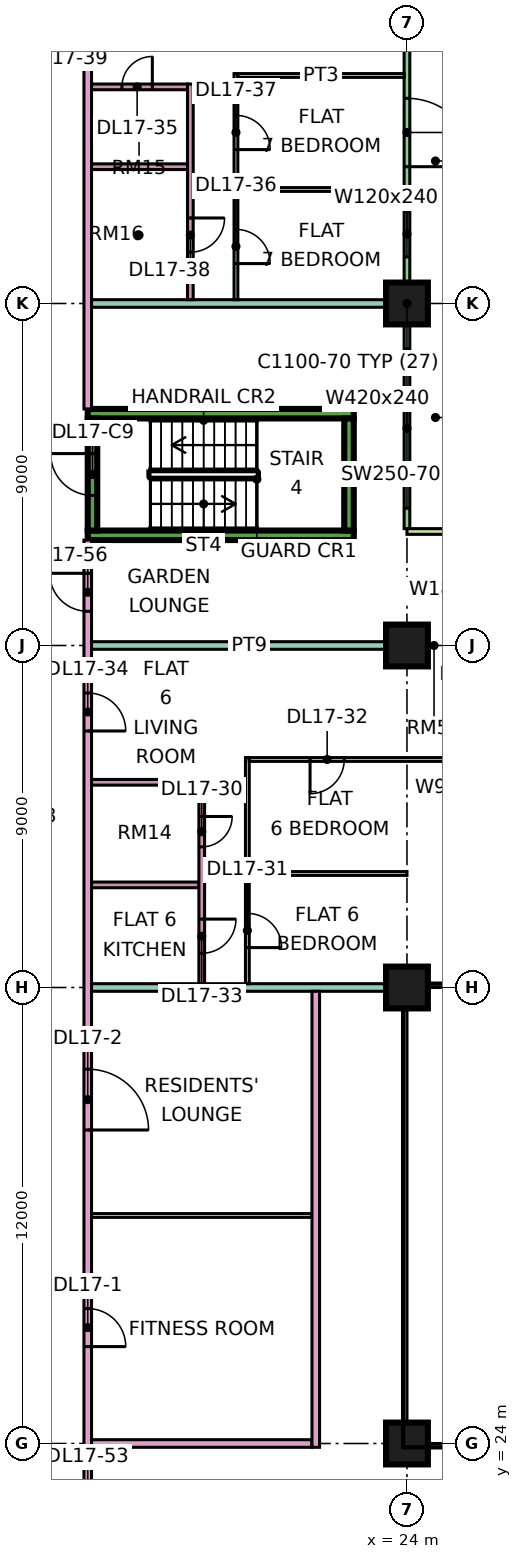
"""IFC4 building model, lengths in metres.
Left out: names, types, materials, properties, quantities, classifications, styles, units other than length and angle.
Written with IfcOpenShell. Run it as: python <this file> out.ifc"""

import sys

from ifc_helpers import new_model, si_unit, direction, frame, frame_2d, origin, origin_2d, place, context, subcontext, project, spatial, rectangle, extrude, element, fill, save


model = new_model("IFC4")
c1 = context("Model", 3, precision=1e-05, world=origin(), true_north=direction((0.0, 1.0)))
c2 = subcontext(c1, "Body", "Model", "MODEL_VIEW")
j1 = project(units=[si_unit("LENGTHUNIT", "METRE"), si_unit("PLANEANGLEUNIT", "RADIAN")], contexts=[c1])
p1 = place(None, origin())
s1 = spatial("IfcSite", under=j1, at=p1, CompositionType="ELEMENT")
p2 = place(p1, origin())
s2 = spatial("IfcBuilding", under=s1, at=p2, CompositionType="ELEMENT")
p3 = place(p2, frame((0.0, 0.0, 78.9)))
s3 = spatial("IfcBuildingStorey", under=s2, at=p3, CompositionType="ELEMENT", Elevation=78.9)
for number, where, z_axis, x_axis in (
    (1, (24.0, 24.0, 0.0), (0.0, 0.0, 1.0), (1.0, 0.0, 0.0)),
    (2, (24.0, 36.0, 0.0), (0.0, 0.0, 1.0), (1.0, 0.0, 0.0)),
    (3, (24.0, 45.0, 0.0), (0.0, 0.0, 1.0), (1.0, 0.0, 0.0)),
    (4, (24.0, 54.0, 0.0), (0.0, 0.0, 1.0), (1.0, 0.0, 0.0)),
):
    element("IfcColumn", number, at=place(p3, frame(where, z_axis=z_axis, x_axis=x_axis)), inside=s3, PredefinedType="COLUMN", context=c2, shape_type="SweptSolid", body=[
        extrude(rectangle(XDim=1.1, YDim=1.1, at=origin_2d()), origin(), (0.0, 0.0, 1.0), 3.75),
    ])
for number, where, z_axis, x_axis in (
    (5, (15.6, 47.9, 0.0), (0.0, 0.0, 1.0), (1.0, 0.0, 0.0)),
    (6, (15.6, 51.1, 0.0), (0.0, 0.0, 1.0), (1.0, 0.0, 0.0)),
):
    element("IfcWall", number, at=place(p3, frame(where, z_axis=z_axis, x_axis=x_axis)), inside=s3, PredefinedType="SHEAR", context=c2, shape_type="SweptSolid", body=[
        extrude(rectangle(XDim=7.0, YDim=0.25, at=frame_2d((3.5, 0.0))), origin(), (0.0, 0.0, 1.0), 3.75),
    ])
p4 = place(p3, frame((15.725, 48.025, 0.0), z_axis=(0.0, 0.0, 1.0), x_axis=(0.0, 1.0, 0.0)))
e7 = element("IfcWall", 7, at=p4, inside=s3, PredefinedType="SHEAR", context=c2, shape_type="SweptSolid", body=[
    extrude(rectangle(XDim=2.95, YDim=0.25, at=frame_2d((1.475, 0.0))), origin(), (0.0, 0.0, 1.0), 3.75),
])
p5 = place(p4, frame((0.925, 0.0, 0.0)))
e8 = element("IfcOpeningElement", 8, at=p5, cuts=e7, PredefinedType="OPENING", context=c2, shape_type="SweptSolid", body=[
    extrude(rectangle(XDim=1.1, YDim=2.2, at=frame_2d((0.55, 1.1))), frame((0.0, 0.135, 0.0), z_axis=(0.0, -1.0, 0.0), x_axis=(1.0, 0.0, 0.0)), (0.0, 0.0, 1.0), 0.27),
])
p6 = place(p3, frame((22.475, 48.025, 0.0), z_axis=(0.0, 0.0, 1.0), x_axis=(0.0, 1.0, 0.0)))
e9 = element("IfcWall", 9, at=p6, inside=s3, PredefinedType="SHEAR", context=c2, shape_type="SweptSolid", body=[
    extrude(rectangle(XDim=2.95, YDim=0.25, at=frame_2d((1.475, 0.0))), origin(), (0.0, 0.0, 1.0), 3.75),
])
p7 = place(p3, frame((24.0, 48.075, 0.0), z_axis=(0.0, 0.0, 1.0), x_axis=(0.0, 1.0, 0.0)))
e10 = element("IfcWall", 10, at=p7, inside=s3, PredefinedType="SOLIDWALL", context=c2, shape_type="SweptSolid", body=[
    extrude(rectangle(XDim=13.35, YDim=0.15, at=frame_2d((6.675, 0.0))), origin(), (0.0, 0.0, 1.0), 3.35),
])
p8 = place(p7, frame((0.538, 0.0, 0.45)))
e11 = element("IfcOpeningElement", 11, at=p8, cuts=e10, PredefinedType="OPENING", context=c2, shape_type="SweptSolid", body=[
    extrude(rectangle(XDim=4.2, YDim=2.4, at=frame_2d((2.1, 1.2))), frame((0.0, 0.085, 0.0), z_axis=(0.0, -1.0, 0.0), x_axis=(1.0, 0.0, 0.0)), (0.0, 0.0, 1.0), 0.17),
])
p9 = place(p7, frame((7.15, 0.0, 0.45)))
e12 = element("IfcOpeningElement", 12, at=p9, cuts=e10, PredefinedType="OPENING", context=c2, shape_type="SweptSolid", body=[
    extrude(rectangle(XDim=1.2, YDim=2.4, at=frame_2d((0.6, 1.2))), frame((0.0, 0.085, 0.0), z_axis=(0.0, -1.0, 0.0), x_axis=(1.0, 0.0, 0.0)), (0.0, 0.0, 1.0), 0.17),
])
p10 = place(p7, frame((9.525, 0.0, 0.0)))
e13 = element("IfcOpeningElement", 13, at=p10, cuts=e10, PredefinedType="OPENING", context=c2, shape_type="SweptSolid", body=[
    extrude(rectangle(XDim=1.8, YDim=2.4, at=frame_2d((0.9, 1.2))), frame((0.0, 0.085, 0.0), z_axis=(0.0, -1.0, 0.0), x_axis=(1.0, 0.0, 0.0)), (0.0, 0.0, 1.0), 0.17),
])
p11 = place(p3, frame((25.5, 48.0, 0.0), z_axis=(0.0, 0.0, 1.0), x_axis=(-1.0, 0.0, 0.0)))
e14 = element("IfcWall", 14, at=p11, inside=s3, PredefinedType="SOLIDWALL", context=c2, shape_type="SweptSolid", body=[
    extrude(rectangle(XDim=1.5, YDim=0.15, at=frame_2d((0.75, 0.0))), origin(), (0.0, 0.0, 1.0), 3.35),
])
p12 = place(p3, frame((15.6, 20.0, 0.0), z_axis=(0.0, 0.0, 1.0), x_axis=(0.0, 1.0, 0.0)))
e15 = element("IfcWall", 15, at=p12, inside=s3, PredefinedType="PARTITIONING", context=c2, shape_type="SweptSolid", body=[
    extrude(rectangle(XDim=27.775, YDim=0.2, at=frame_2d((13.887, 0.0))), origin(), (0.0, 0.0, 1.0), 3.35),
])
p13 = place(p12, frame((6.55, 0.0, 0.0)))
e16 = element("IfcOpeningElement", 16, at=p13, cuts=e15, PredefinedType="OPENING", context=c2, shape_type="SweptSolid", body=[
    extrude(rectangle(XDim=1.0, YDim=2.1, at=frame_2d((0.5, 1.05))), frame((0.0, 0.11, 0.0), z_axis=(0.0, -1.0, 0.0), x_axis=(1.0, 0.0, 0.0)), (0.0, 0.0, 1.0), 0.22),
])
p14 = place(p12, frame((12.25, 0.0, 0.0)))
e17 = element("IfcOpeningElement", 17, at=p14, cuts=e15, PredefinedType="OPENING", context=c2, shape_type="SweptSolid", body=[
    extrude(rectangle(XDim=1.6, YDim=2.1, at=frame_2d((0.8, 1.05))), frame((0.0, 0.11, 0.0), z_axis=(0.0, -1.0, 0.0), x_axis=(1.0, 0.0, 0.0)), (0.0, 0.0, 1.0), 0.22),
])
p15 = place(p12, frame((22.75, 0.0, 0.0)))
e18 = element("IfcOpeningElement", 18, at=p15, cuts=e15, PredefinedType="OPENING", context=c2, shape_type="SweptSolid", body=[
    extrude(rectangle(XDim=1.0, YDim=2.1, at=frame_2d((0.5, 1.05))), frame((0.0, 0.11, 0.0), z_axis=(0.0, -1.0, 0.0), x_axis=(1.0, 0.0, 0.0)), (0.0, 0.0, 1.0), 0.22),
])
p16 = place(p12, frame((1.15, 0.0, 0.0)))
e19 = element("IfcOpeningElement", 19, at=p16, cuts=e15, PredefinedType="OPENING", context=c2, shape_type="SweptSolid", body=[
    extrude(rectangle(XDim=1.8, YDim=2.1, at=frame_2d((0.9, 1.05))), frame((0.0, 0.11, 0.0), z_axis=(0.0, -1.0, 0.0), x_axis=(1.0, 0.0, 0.0)), (0.0, 0.0, 1.0), 0.22),
])
p17 = place(p12, frame((25.9, 0.0, 0.0)))
e20 = element("IfcOpeningElement", 20, at=p17, cuts=e15, PredefinedType="OPENING", context=c2, shape_type="SweptSolid", body=[
    extrude(rectangle(XDim=1.0, YDim=2.1, at=frame_2d((0.5, 1.05))), frame((0.0, 0.11, 0.0), z_axis=(0.0, -1.0, 0.0), x_axis=(1.0, 0.0, 0.0)), (0.0, 0.0, 1.0), 0.22),
])
p18 = place(p3, frame((15.6, 51.225, 0.0), z_axis=(0.0, 0.0, 1.0), x_axis=(0.0, 1.0, 0.0)))
e21 = element("IfcWall", 21, at=p18, inside=s3, PredefinedType="PARTITIONING", context=c2, shape_type="SweptSolid", body=[
    extrude(rectangle(XDim=13.125, YDim=0.2, at=frame_2d((6.562, 0.0))), origin(), (0.0, 0.0, 1.0), 3.35),
])
p19 = place(p18, frame((9.675, 0.0, 0.0)))
e22 = element("IfcOpeningElement", 22, at=p19, cuts=e21, PredefinedType="OPENING", context=c2, shape_type="SweptSolid", body=[
    extrude(rectangle(XDim=1.0, YDim=2.1, at=frame_2d((0.5, 1.05))), frame((0.0, 0.11, 0.0), z_axis=(0.0, -1.0, 0.0), x_axis=(1.0, 0.0, 0.0)), (0.0, 0.0, 1.0), 0.22),
])
p20 = place(p3, frame((15.7, 24.0, 0.0), z_axis=(0.0, 0.0, 1.0), x_axis=(1.0, 0.0, 0.0)))
e23 = element("IfcWall", 23, at=p20, inside=s3, PredefinedType="PARTITIONING", context=c2, shape_type="SweptSolid", body=[
    extrude(rectangle(XDim=5.8, YDim=0.2, at=frame_2d((2.9, 0.0))), origin(), (0.0, 0.0, 1.0), 3.35),
])
p21 = place(p3, frame((15.7, 30.0, 0.0), z_axis=(0.0, 0.0, 1.0), x_axis=(1.0, 0.0, 0.0)))
e24 = element("IfcWall", 24, at=p21, inside=s3, PredefinedType="PARTITIONING", context=c2, shape_type="SweptSolid", body=[
    extrude(rectangle(XDim=5.8, YDim=0.1, at=frame_2d((2.9, 0.0))), origin(), (0.0, 0.0, 1.0), 3.35),
])
p22 = place(p3, frame((15.7, 36.0, 0.0), z_axis=(0.0, 0.0, 1.0), x_axis=(1.0, 0.0, 0.0)))
e25 = element("IfcWall", 25, at=p22, inside=s3, PredefinedType="PARTITIONING", context=c2, shape_type="SweptSolid", body=[
    extrude(rectangle(XDim=8.3, YDim=0.2, at=frame_2d((4.15, 0.0))), origin(), (0.0, 0.0, 1.0), 3.35),
])
for number, where, z_axis, x_axis in (
    (26, (15.7, 38.7, 0.0), (0.0, 0.0, 1.0), (1.0, 0.0, 0.0)),
    (27, (15.7, 41.4, 0.0), (0.0, 0.0, 1.0), (1.0, 0.0, 0.0)),
):
    element("IfcWall", number, at=place(p3, frame(where, z_axis=z_axis, x_axis=x_axis)), inside=s3, PredefinedType="PARTITIONING", context=c2, shape_type="SweptSolid", body=[
        extrude(rectangle(XDim=2.825, YDim=0.15, at=frame_2d((1.413, 0.0))), origin(), (0.0, 0.0, 1.0), 3.35),
    ])
p23 = place(p3, frame((15.7, 45.0, 0.0), z_axis=(0.0, 0.0, 1.0), x_axis=(1.0, 0.0, 0.0)))
e28 = element("IfcWall", 28, at=p23, inside=s3, PredefinedType="PARTITIONING", context=c2, shape_type="SweptSolid", body=[
    extrude(rectangle(XDim=8.3, YDim=0.2, at=frame_2d((4.15, 0.0))), origin(), (0.0, 0.0, 1.0), 3.35),
])
p24 = place(p3, frame((15.7, 54.0, 0.0), z_axis=(0.0, 0.0, 1.0), x_axis=(1.0, 0.0, 0.0)))
e29 = element("IfcWall", 29, at=p24, inside=s3, PredefinedType="PARTITIONING", context=c2, shape_type="SweptSolid", body=[
    extrude(rectangle(XDim=8.226, YDim=0.2, at=frame_2d((4.113, 0.0))), origin(), (0.0, 0.0, 1.0), 3.35),
])
p25 = place(p3, frame((15.7, 57.6, 0.0), z_axis=(0.0, 0.0, 1.0), x_axis=(1.0, 0.0, 0.0)))
e30 = element("IfcWall", 30, at=p25, inside=s3, PredefinedType="PARTITIONING", context=c2, shape_type="SweptSolid", body=[
    extrude(rectangle(XDim=2.525, YDim=0.15, at=frame_2d((1.263, 0.0))), origin(), (0.0, 0.0, 1.0), 3.35),
])
p26 = place(p3, frame((15.7, 59.7, 0.0), z_axis=(0.0, 0.0, 1.0), x_axis=(1.0, 0.0, 0.0)))
e31 = element("IfcWall", 31, at=p26, inside=s3, PredefinedType="PARTITIONING", context=c2, shape_type="SweptSolid", body=[
    extrude(rectangle(XDim=2.525, YDim=0.15, at=frame_2d((1.263, 0.0))), origin(), (0.0, 0.0, 1.0), 3.35),
])
p27 = place(p26, frame((0.8, 0.0, 0.0)))
e32 = element("IfcOpeningElement", 32, at=p27, cuts=e31, PredefinedType="OPENING", context=c2, shape_type="SweptSolid", body=[
    extrude(rectangle(XDim=0.8, YDim=2.1, at=frame_2d((0.4, 1.05))), frame((0.0, 0.085, 0.0), z_axis=(0.0, -1.0, 0.0), x_axis=(1.0, 0.0, 0.0)), (0.0, 0.0, 1.0), 0.17),
])
p28 = place(p3, frame((18.3, 54.1, 0.0), z_axis=(0.0, 0.0, 1.0), x_axis=(0.0, 1.0, 0.0)))
e33 = element("IfcWall", 33, at=p28, inside=s3, PredefinedType="PARTITIONING", context=c2, shape_type="SweptSolid", body=[
    extrude(rectangle(XDim=5.675, YDim=0.15, at=frame_2d((2.837, 0.0))), origin(), (0.0, 0.0, 1.0), 3.35),
])
p29 = place(p28, frame((1.25, 0.0, 0.0)))
e34 = element("IfcOpeningElement", 34, at=p29, cuts=e33, PredefinedType="OPENING", context=c2, shape_type="SweptSolid", body=[
    extrude(rectangle(XDim=0.9, YDim=2.1, at=frame_2d((0.45, 1.05))), frame((0.0, 0.085, 0.0), z_axis=(0.0, -1.0, 0.0), x_axis=(1.0, 0.0, 0.0)), (0.0, 0.0, 1.0), 0.17),
])
p30 = place(p3, frame((18.6, 36.1, 0.0), z_axis=(0.0, 0.0, 1.0), x_axis=(0.0, 1.0, 0.0)))
e35 = element("IfcWall", 35, at=p30, inside=s3, PredefinedType="PARTITIONING", context=c2, shape_type="SweptSolid", body=[
    extrude(rectangle(XDim=5.375, YDim=0.15, at=frame_2d((2.688, 0.0))), origin(), (0.0, 0.0, 1.0), 3.35),
])
p31 = place(p30, frame((3.6, 0.0, 0.0)))
e36 = element("IfcOpeningElement", 36, at=p31, cuts=e35, PredefinedType="OPENING", context=c2, shape_type="SweptSolid", body=[
    extrude(rectangle(XDim=0.8, YDim=2.1, at=frame_2d((0.4, 1.05))), frame((0.0, 0.085, 0.0), z_axis=(0.0, -1.0, 0.0), x_axis=(1.0, 0.0, 0.0)), (0.0, 0.0, 1.0), 0.17),
])
p32 = place(p30, frame((0.8, 0.0, 0.0)))
e37 = element("IfcOpeningElement", 37, at=p32, cuts=e35, PredefinedType="OPENING", context=c2, shape_type="SweptSolid", body=[
    extrude(rectangle(XDim=0.9, YDim=2.1, at=frame_2d((0.45, 1.05))), frame((0.0, 0.085, 0.0), z_axis=(0.0, -1.0, 0.0), x_axis=(1.0, 0.0, 0.0)), (0.0, 0.0, 1.0), 0.17),
])
p33 = place(p3, frame((19.5, 54.1, 0.0), z_axis=(0.0, 0.0, 1.0), x_axis=(0.0, 1.0, 0.0)))
e38 = element("IfcWall", 38, at=p33, inside=s3, PredefinedType="PARTITIONING", context=c2, shape_type="SweptSolid", body=[
    extrude(rectangle(XDim=5.95, YDim=0.1, at=frame_2d((2.975, 0.0))), origin(), (0.0, 0.0, 1.0), 3.35),
])
p34 = place(p33, frame((0.95, 0.0, 0.0)))
e39 = element("IfcOpeningElement", 39, at=p34, cuts=e38, PredefinedType="OPENING", context=c2, shape_type="SweptSolid", body=[
    extrude(rectangle(XDim=0.9, YDim=2.1, at=frame_2d((0.45, 1.05))), frame((0.0, 0.06, 0.0), z_axis=(0.0, -1.0, 0.0), x_axis=(1.0, 0.0, 0.0)), (0.0, 0.0, 1.0), 0.12),
])
p35 = place(p33, frame((3.95, 0.0, 0.0)))
e40 = element("IfcOpeningElement", 40, at=p35, cuts=e38, PredefinedType="OPENING", context=c2, shape_type="SweptSolid", body=[
    extrude(rectangle(XDim=0.9, YDim=2.1, at=frame_2d((0.45, 1.05))), frame((0.0, 0.06, 0.0), z_axis=(0.0, -1.0, 0.0), x_axis=(1.0, 0.0, 0.0)), (0.0, 0.0, 1.0), 0.12),
])
for number, where, z_axis, x_axis in (
    (41, (19.55, 57.0, 0.0), (0.0, 0.0, 1.0), (1.0, 0.0, 0.0)),
    (42, (19.55, 60.0, 0.0), (0.0, 0.0, 1.0), (1.0, 0.0, 0.0)),
):
    element("IfcWall", number, at=place(p3, frame(where, z_axis=z_axis, x_axis=x_axis)), inside=s3, PredefinedType="PARTITIONING", context=c2, shape_type="SweptSolid", body=[
        extrude(rectangle(XDim=4.376, YDim=0.1, at=frame_2d((2.188, 0.0))), origin(), (0.0, 0.0, 1.0), 3.35),
    ])
p36 = place(p3, frame((19.8, 36.1, 0.0), z_axis=(0.0, 0.0, 1.0), x_axis=(0.0, 1.0, 0.0)))
e43 = element("IfcWall", 43, at=p36, inside=s3, PredefinedType="PARTITIONING", context=c2, shape_type="SweptSolid", body=[
    extrude(rectangle(XDim=5.95, YDim=0.1, at=frame_2d((2.975, 0.0))), origin(), (0.0, 0.0, 1.0), 3.35),
])
p37 = place(p36, frame((0.95, 0.0, 0.0)))
e44 = element("IfcOpeningElement", 44, at=p37, cuts=e43, PredefinedType="OPENING", context=c2, shape_type="SweptSolid", body=[
    extrude(rectangle(XDim=0.9, YDim=2.1, at=frame_2d((0.45, 1.05))), frame((0.0, 0.06, 0.0), z_axis=(0.0, -1.0, 0.0), x_axis=(1.0, 0.0, 0.0)), (0.0, 0.0, 1.0), 0.12),
])
p38 = place(p3, frame((19.85, 39.0, 0.0), z_axis=(0.0, 0.0, 1.0), x_axis=(1.0, 0.0, 0.0)))
e45 = element("IfcWall", 45, at=p38, inside=s3, PredefinedType="PARTITIONING", context=c2, shape_type="SweptSolid", body=[
    extrude(rectangle(XDim=4.15, YDim=0.1, at=frame_2d((2.075, 0.0))), origin(), (0.0, 0.0, 1.0), 3.35),
])
p39 = place(p3, frame((19.85, 42.0, 0.0), z_axis=(0.0, 0.0, 1.0), x_axis=(1.0, 0.0, 0.0)))
e46 = element("IfcWall", 46, at=p39, inside=s3, PredefinedType="PARTITIONING", context=c2, shape_type="SweptSolid", body=[
    extrude(rectangle(XDim=5.5, YDim=0.1, at=frame_2d((2.75, 0.0))), origin(), (0.0, 0.0, 1.0), 3.35),
])
p40 = place(p39, frame((1.6, 0.0, 0.0)))
e47 = element("IfcOpeningElement", 47, at=p40, cuts=e46, PredefinedType="OPENING", context=c2, shape_type="SweptSolid", body=[
    extrude(rectangle(XDim=0.9, YDim=2.1, at=frame_2d((0.45, 1.05))), frame((0.0, 0.06, 0.0), z_axis=(0.0, -1.0, 0.0), x_axis=(1.0, 0.0, 0.0)), (0.0, 0.0, 1.0), 0.12),
])
p41 = place(p3, frame((21.6, 23.9, 0.0), z_axis=(0.0, 0.0, 1.0), x_axis=(0.0, 1.0, 0.0)))
e48 = element("IfcWall", 48, at=p41, inside=s3, PredefinedType="PARTITIONING", context=c2, shape_type="SweptSolid", body=[
    extrude(rectangle(XDim=12.0, YDim=0.2, at=frame_2d((6.0, 0.0))), origin(), (0.0, 0.0, 1.0), 3.35),
])
p42 = place(p8, origin())
e49 = element("IfcWindow", 49, at=p42, inside=s3, PartitioningType="SINGLE_PANEL", PredefinedType="WINDOW", context=c2, shape_type="SweptSolid", body=[
    extrude(rectangle(XDim=4.2, YDim=2.4, at=frame_2d((2.1, 1.2))), frame((0.0, 0.03, 0.0), z_axis=(0.0, -1.0, 0.0), x_axis=(1.0, 0.0, 0.0)), (0.0, 0.0, 1.0), 0.06),
])
fill(e11, e49)
p43 = place(p9, origin())
e50 = element("IfcWindow", 50, at=p43, inside=s3, PartitioningType="SINGLE_PANEL", PredefinedType="WINDOW", context=c2, shape_type="SweptSolid", body=[
    extrude(rectangle(XDim=1.2, YDim=2.4, at=frame_2d((0.6, 1.2))), frame((0.0, 0.03, 0.0), z_axis=(0.0, -1.0, 0.0), x_axis=(1.0, 0.0, 0.0)), (0.0, 0.0, 1.0), 0.06),
])
fill(e12, e50)
p44 = place(p10, frame((1.8, 0.0, 0.0), z_axis=(0.0, 0.0, 1.0), x_axis=(-1.0, 0.0, 0.0)))
e51 = element("IfcDoor", 51, at=p44, inside=s3, OperationType="DOUBLE_DOOR_SINGLE_SWING", PredefinedType="DOOR", context=c2, shape_type="SweptSolid", body=[
    extrude(rectangle(XDim=1.8, YDim=2.4, at=frame_2d((0.9, 1.2))), frame((0.0, 0.025, 0.0), z_axis=(0.0, -1.0, 0.0), x_axis=(1.0, 0.0, 0.0)), (0.0, 0.0, 1.0), 0.05),
])
fill(e13, e51)
p45 = place(p5, frame((1.1, 0.0, 0.0), z_axis=(0.0, 0.0, 1.0), x_axis=(-1.0, 0.0, 0.0)))
e52 = element("IfcDoor", 52, at=p45, inside=s3, OperationType="SINGLE_SWING_RIGHT", PredefinedType="DOOR", context=c2, shape_type="SweptSolid", body=[
    extrude(rectangle(XDim=1.1, YDim=2.2, at=frame_2d((0.55, 1.1))), frame((0.0, 0.025, 0.0), z_axis=(0.0, -1.0, 0.0), x_axis=(1.0, 0.0, 0.0)), (0.0, 0.0, 1.0), 0.05),
])
fill(e8, e52)
p46 = place(p13, frame((1.0, 0.0, 0.0), z_axis=(0.0, 0.0, 1.0), x_axis=(-1.0, 0.0, 0.0)))
e53 = element("IfcDoor", 53, at=p46, inside=s3, OperationType="SINGLE_SWING_LEFT", PredefinedType="DOOR", context=c2, shape_type="SweptSolid", body=[
    extrude(rectangle(XDim=1.0, YDim=2.1, at=frame_2d((0.5, 1.05))), frame((0.0, 0.025, 0.0), z_axis=(0.0, -1.0, 0.0), x_axis=(1.0, 0.0, 0.0)), (0.0, 0.0, 1.0), 0.05),
])
fill(e16, e53)
p47 = place(p14, frame((1.6, 0.0, 0.0), z_axis=(0.0, 0.0, 1.0), x_axis=(-1.0, 0.0, 0.0)))
e54 = element("IfcDoor", 54, at=p47, inside=s3, OperationType="DOUBLE_DOOR_SINGLE_SWING", PredefinedType="DOOR", context=c2, shape_type="SweptSolid", body=[
    extrude(rectangle(XDim=1.6, YDim=2.1, at=frame_2d((0.8, 1.05))), frame((0.0, 0.025, 0.0), z_axis=(0.0, -1.0, 0.0), x_axis=(1.0, 0.0, 0.0)), (0.0, 0.0, 1.0), 0.05),
])
fill(e17, e54)
p48 = place(p31, origin())
e55 = element("IfcDoor", 55, at=p48, inside=s3, OperationType="SINGLE_SWING_RIGHT", PredefinedType="DOOR", context=c2, shape_type="SweptSolid", body=[
    extrude(rectangle(XDim=0.8, YDim=2.1, at=frame_2d((0.4, 1.05))), frame((0.0, 0.025, 0.0), z_axis=(0.0, -1.0, 0.0), x_axis=(1.0, 0.0, 0.0)), (0.0, 0.0, 1.0), 0.05),
])
fill(e36, e55)
p49 = place(p37, frame((0.9, 0.0, 0.0), z_axis=(0.0, 0.0, 1.0), x_axis=(-1.0, 0.0, 0.0)))
e56 = element("IfcDoor", 56, at=p49, inside=s3, OperationType="SINGLE_SWING_LEFT", PredefinedType="DOOR", context=c2, shape_type="SweptSolid", body=[
    extrude(rectangle(XDim=0.9, YDim=2.1, at=frame_2d((0.45, 1.05))), frame((0.0, 0.025, 0.0), z_axis=(0.0, -1.0, 0.0), x_axis=(1.0, 0.0, 0.0)), (0.0, 0.0, 1.0), 0.05),
])
fill(e44, e56)
p50 = place(p40, frame((0.9, 0.0, 0.0), z_axis=(0.0, 0.0, 1.0), x_axis=(-1.0, 0.0, 0.0)))
e57 = element("IfcDoor", 57, at=p50, inside=s3, OperationType="SINGLE_SWING_LEFT", PredefinedType="DOOR", context=c2, shape_type="SweptSolid", body=[
    extrude(rectangle(XDim=0.9, YDim=2.1, at=frame_2d((0.45, 1.05))), frame((0.0, 0.025, 0.0), z_axis=(0.0, -1.0, 0.0), x_axis=(1.0, 0.0, 0.0)), (0.0, 0.0, 1.0), 0.05),
])
fill(e47, e57)
p51 = place(p32, origin())
e58 = element("IfcDoor", 58, at=p51, inside=s3, OperationType="SINGLE_SWING_RIGHT", PredefinedType="DOOR", context=c2, shape_type="SweptSolid", body=[
    extrude(rectangle(XDim=0.9, YDim=2.1, at=frame_2d((0.45, 1.05))), frame((0.0, 0.025, 0.0), z_axis=(0.0, -1.0, 0.0), x_axis=(1.0, 0.0, 0.0)), (0.0, 0.0, 1.0), 0.05),
])
fill(e37, e58)
p52 = place(p15, frame((1.0, 0.0, 0.0), z_axis=(0.0, 0.0, 1.0), x_axis=(-1.0, 0.0, 0.0)))
e59 = element("IfcDoor", 59, at=p52, inside=s3, OperationType="SINGLE_SWING_LEFT", PredefinedType="DOOR", context=c2, shape_type="SweptSolid", body=[
    extrude(rectangle(XDim=1.0, YDim=2.1, at=frame_2d((0.5, 1.05))), frame((0.0, 0.025, 0.0), z_axis=(0.0, -1.0, 0.0), x_axis=(1.0, 0.0, 0.0)), (0.0, 0.0, 1.0), 0.05),
])
fill(e18, e59)
p53 = place(p27, frame((0.8, 0.0, 0.0), z_axis=(0.0, 0.0, 1.0), x_axis=(-1.0, 0.0, 0.0)))
e60 = element("IfcDoor", 60, at=p53, inside=s3, OperationType="SINGLE_SWING_RIGHT", PredefinedType="DOOR", context=c2, shape_type="SweptSolid", body=[
    extrude(rectangle(XDim=0.8, YDim=2.1, at=frame_2d((0.4, 1.05))), frame((0.0, 0.025, 0.0), z_axis=(0.0, -1.0, 0.0), x_axis=(1.0, 0.0, 0.0)), (0.0, 0.0, 1.0), 0.05),
])
fill(e32, e60)
p54 = place(p34, frame((0.9, 0.0, 0.0), z_axis=(0.0, 0.0, 1.0), x_axis=(-1.0, 0.0, 0.0)))
e61 = element("IfcDoor", 61, at=p54, inside=s3, OperationType="SINGLE_SWING_LEFT", PredefinedType="DOOR", context=c2, shape_type="SweptSolid", body=[
    extrude(rectangle(XDim=0.9, YDim=2.1, at=frame_2d((0.45, 1.05))), frame((0.0, 0.025, 0.0), z_axis=(0.0, -1.0, 0.0), x_axis=(1.0, 0.0, 0.0)), (0.0, 0.0, 1.0), 0.05),
])
fill(e39, e61)
p55 = place(p35, frame((0.9, 0.0, 0.0), z_axis=(0.0, 0.0, 1.0), x_axis=(-1.0, 0.0, 0.0)))
e62 = element("IfcDoor", 62, at=p55, inside=s3, OperationType="SINGLE_SWING_LEFT", PredefinedType="DOOR", context=c2, shape_type="SweptSolid", body=[
    extrude(rectangle(XDim=0.9, YDim=2.1, at=frame_2d((0.45, 1.05))), frame((0.0, 0.025, 0.0), z_axis=(0.0, -1.0, 0.0), x_axis=(1.0, 0.0, 0.0)), (0.0, 0.0, 1.0), 0.05),
])
fill(e40, e62)
p56 = place(p29, origin())
e63 = element("IfcDoor", 63, at=p56, inside=s3, OperationType="SINGLE_SWING_RIGHT", PredefinedType="DOOR", context=c2, shape_type="SweptSolid", body=[
    extrude(rectangle(XDim=0.9, YDim=2.1, at=frame_2d((0.45, 1.05))), frame((0.0, 0.025, 0.0), z_axis=(0.0, -1.0, 0.0), x_axis=(1.0, 0.0, 0.0)), (0.0, 0.0, 1.0), 0.05),
])
fill(e34, e63)
p57 = place(p17, frame((1.0, 0.0, 0.0), z_axis=(0.0, 0.0, 1.0), x_axis=(-1.0, 0.0, 0.0)))
e64 = element("IfcDoor", 64, at=p57, inside=s3, OperationType="SINGLE_SWING_RIGHT", PredefinedType="DOOR", context=c2, shape_type="SweptSolid", body=[
    extrude(rectangle(XDim=1.0, YDim=2.1, at=frame_2d((0.5, 1.05))), frame((0.0, 0.025, 0.0), z_axis=(0.0, -1.0, 0.0), x_axis=(1.0, 0.0, 0.0)), (0.0, 0.0, 1.0), 0.05),
])
fill(e20, e64)
save(model, sys.argv[1])
